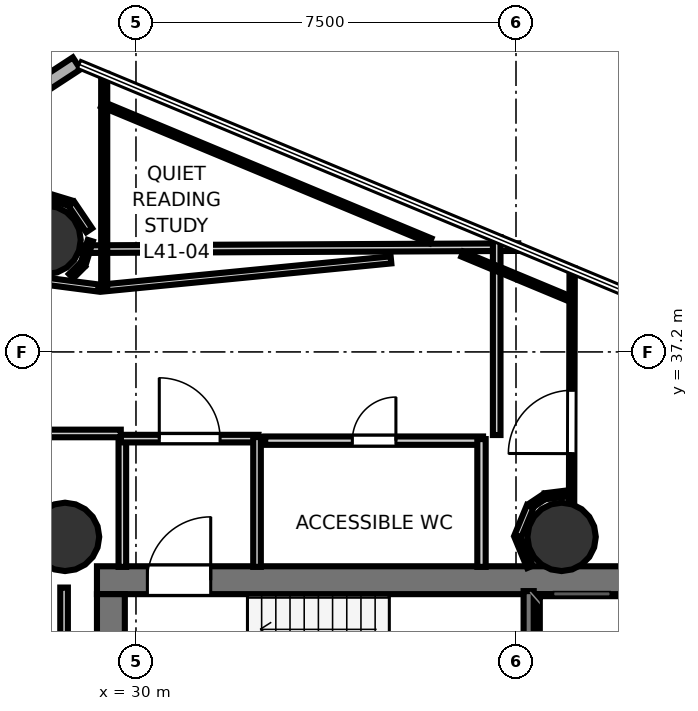
"""IFC4 building model, lengths in metres.
Left out: names, types, materials, properties, quantities, classifications, styles, units other than length and angle.
Written with IfcOpenShell. Run it as: python <this file> out.ifc"""

import sys

from ifc_helpers import new_model, si_unit, direction, frame, frame_2d, origin, origin_2d, place, context, subcontext, project, spatial, rectangle, hollow_circle, extrude, element, fill, save


model = new_model("IFC4")
c1 = context("Model", 3, precision=1e-05, world=origin(), true_north=direction((0.0, 1.0)))
c2 = subcontext(c1, "Body", "Model", "MODEL_VIEW")
j1 = project(units=[si_unit("LENGTHUNIT", "METRE"), si_unit("PLANEANGLEUNIT", "RADIAN")], contexts=[c1])
p1 = place(None, origin())
s1 = spatial("IfcSite", under=j1, at=p1, CompositionType="ELEMENT")
p2 = place(p1, origin())
s2 = spatial("IfcBuilding", under=s1, at=p2, CompositionType="ELEMENT")
p3 = place(p2, frame((0.0, 0.0, 162.4)))
s3 = spatial("IfcBuildingStorey", under=s2, at=p3, CompositionType="ELEMENT", Elevation=162.4)
p4 = place(p3, frame((29.23, 32.695, 0.0), z_axis=(0.0, 0.0, 1.0), x_axis=(1.0, 0.0, 0.0)))
e1 = element("IfcWall", 1, at=p4, inside=s3, PredefinedType="SHEAR", context=c2, shape_type="SweptSolid", body=[
    extrude(rectangle(XDim=10.62, YDim=0.55, at=frame_2d((5.31, 0.0))), origin(), (0.0, 0.0, 1.0), 3.52),
])
p5 = place(p4, frame((0.995, 0.0, 0.0)))
e2 = element("IfcOpeningElement", 2, at=p5, cuts=e1, PredefinedType="OPENING", context=c2, shape_type="SweptSolid", body=[
    extrude(rectangle(XDim=1.25, YDim=2.15, at=frame_2d((0.625, 1.075))), frame((0.0, 0.285, 0.0), z_axis=(0.0, -1.0, 0.0), x_axis=(1.0, 0.0, 0.0)), (0.0, 0.0, 1.0), 0.57),
])
p6 = place(p3, frame((29.505, 24.98, 0.0), z_axis=(0.0, 0.0, 1.0), x_axis=(0.0, 1.0, 0.0)))
e3 = element("IfcWall", 3, at=p6, inside=s3, PredefinedType="SHEAR", context=c2, shape_type="SweptSolid", body=[
    extrude(rectangle(XDim=7.44, YDim=0.55, at=frame_2d((3.72, 0.0))), origin(), (0.0, 0.0, 1.0), 3.52),
])
p7 = place(p3, frame((38.18, 24.98, 0.0), z_axis=(0.0, 0.0, 1.0), x_axis=(0.0, 1.0, 0.0)))
e4 = element("IfcWall", 4, at=p7, inside=s3, PredefinedType="SHEAR", context=c2, shape_type="SweptSolid", body=[
    extrude(rectangle(XDim=7.44, YDim=0.5, at=frame_2d((3.72, 0.0))), origin(), (0.0, 0.0, 1.0), 3.52),
])
for number, where, z_axis, x_axis in (
    (5, (28.6, 33.55, 0.0), (0.0, 0.0, 1.0), (1.0, 0.0, 0.0)),
    (6, (38.4, 33.55, 0.0), (0.0, 0.0, 1.0), (1.0, 0.0, 0.0)),
    (7, (28.235, 39.411, 0.0), (0.0, 0.0, 1.0), (1.0, 0.0, 0.0)),
):
    element("IfcColumn", number, at=place(p3, frame(where, z_axis=z_axis, x_axis=x_axis)), inside=s3, PredefinedType="COLUMN", context=c2, shape_type="SweptSolid", body=[
        extrude(hollow_circle(Radius=0.675, WallThickness=0.032, at=origin_2d()), origin(), (0.0, 0.0, 1.0), 3.7),
    ])
p8 = place(p3, frame((28.83, 42.894, 0.0), z_axis=(0.0, 0.0, 1.0), x_axis=(-0.837273291315, -0.5467846337, 0.0)))
e8 = element("IfcWall", 8, at=p8, inside=s3, PredefinedType="SOLIDWALL", context=c2, shape_type="SweptSolid", body=[
    extrude(rectangle(XDim=9.004, YDim=0.28, at=frame_2d((4.502, 0.0))), origin(), (0.0, 0.0, 1.0), 3.52),
])
p9 = place(p8, frame((1.951, 0.0, 0.85)))
e9 = element("IfcOpeningElement", 9, at=p9, cuts=e8, PredefinedType="OPENING", context=c2, shape_type="SweptSolid", body=[
    extrude(rectangle(XDim=1.5, YDim=2.1, at=frame_2d((0.75, 1.05))), frame((0.0, 0.15, 0.0), z_axis=(0.0, -1.0, 0.0), x_axis=(1.0, 0.0, 0.0)), (0.0, 0.0, 1.0), 0.3),
])
p10 = place(p3, frame((37.75, 30.12, 0.0), z_axis=(0.0, 0.0, 1.0), x_axis=(0.0, 1.0, 0.0)))
e10 = element("IfcWall", 10, at=p10, inside=s3, PredefinedType="SOLIDWALL", context=c2, shape_type="SweptSolid", body=[
    extrude(rectangle(XDim=2.36, YDim=0.2, at=frame_2d((1.18, 0.0))), origin(), (0.0, 0.0, 1.0), 3.52),
])
p11 = place(p3, frame((29.731, 32.958, 0.0), z_axis=(0.0, 0.0, 1.0), x_axis=(0.0, 1.0, 0.0)))
e11 = element("IfcWall", 11, at=p11, inside=s3, PredefinedType="PARTITIONING", context=c2, shape_type="SweptSolid", body=[
    extrude(rectangle(XDim=2.562, YDim=0.15, at=frame_2d((1.281, 0.0))), origin(), (0.0, 0.0, 1.0), 2.84),
])
p12 = place(p3, frame((29.7, 35.489, 0.0), z_axis=(0.0, 0.0, 1.0), x_axis=(1.0, 0.0, 0.0)))
e12 = element("IfcWall", 12, at=p12, inside=s3, PredefinedType="PARTITIONING", context=c2, shape_type="SweptSolid", body=[
    extrude(rectangle(XDim=2.72, YDim=0.15, at=frame_2d((1.36, 0.0))), origin(), (0.0, 0.0, 1.0), 2.84),
])
p13 = place(p12, frame((0.76, 0.0, 0.0)))
e13 = element("IfcOpeningElement", 13, at=p13, cuts=e12, PredefinedType="OPENING", context=c2, shape_type="SweptSolid", body=[
    extrude(rectangle(XDim=1.2, YDim=2.15, at=frame_2d((0.6, 1.075))), frame((0.0, 0.085, 0.0), z_axis=(0.0, -1.0, 0.0), x_axis=(1.0, 0.0, 0.0)), (0.0, 0.0, 1.0), 0.17),
])
p14 = place(p3, frame((32.389, 35.52, 0.0), z_axis=(0.0, 0.0, 1.0), x_axis=(0.0, -1.0, 0.0)))
e14 = element("IfcWall", 14, at=p14, inside=s3, PredefinedType="PARTITIONING", context=c2, shape_type="SweptSolid", body=[
    extrude(rectangle(XDim=2.562, YDim=0.15, at=frame_2d((1.281, 0.0))), origin(), (0.0, 0.0, 1.0), 2.84),
])
p15 = place(p3, frame((32.55, 35.449, 0.0), z_axis=(0.0, 0.0, 1.0), x_axis=(1.0, 0.0, 0.0)))
e15 = element("IfcWall", 15, at=p15, inside=s3, PredefinedType="PLUMBINGWALL", context=c2, shape_type="SweptSolid", body=[
    extrude(rectangle(XDim=4.3, YDim=0.165, at=frame_2d((2.15, 0.0))), origin(), (0.0, 0.0, 1.0), 2.84),
])
p16 = place(p15, frame((1.72, 0.0, 0.0)))
e16 = element("IfcOpeningElement", 16, at=p16, cuts=e15, PredefinedType="OPENING", context=c2, shape_type="SweptSolid", body=[
    extrude(rectangle(XDim=0.86, YDim=2.05, at=frame_2d((0.43, 1.025))), frame((0.0, 0.093, 0.0), z_axis=(0.0, -1.0, 0.0), x_axis=(1.0, 0.0, 0.0)), (0.0, 0.0, 1.0), 0.185),
])
p17 = place(p3, frame((36.819, 35.48, 0.0), z_axis=(0.0, 0.0, 1.0), x_axis=(0.0, -1.0, 0.0)))
e17 = element("IfcWall", 17, at=p17, inside=s3, PredefinedType="PLUMBINGWALL", context=c2, shape_type="SweptSolid", body=[
    extrude(rectangle(XDim=2.522, YDim=0.165, at=frame_2d((1.261, 0.0))), origin(), (0.0, 0.0, 1.0), 2.84),
])
p18 = place(p3, frame((28.581, 24.68, 0.0), z_axis=(0.0, 0.0, 1.0), x_axis=(0.0, 1.0, 0.0)))
e18 = element("IfcWall", 18, at=p18, inside=s3, PredefinedType="PARTITIONING", context=c2, shape_type="SweptSolid", body=[
    extrude(rectangle(XDim=7.87, YDim=0.15, at=frame_2d((3.935, 0.0))), origin(), (0.0, 0.0, 1.0), 2.84),
])
p19 = place(p3, frame((23.174, 39.201, 0.0), z_axis=(0.0, 0.0, 1.0), x_axis=(0.999989166238, 0.004654826148, 0.0)))
e19 = element("IfcWall", 19, at=p19, inside=s3, PredefinedType="PARTITIONING", context=c2, shape_type="SweptSolid", body=[
    extrude(rectangle(XDim=14.371, YDim=0.15, at=frame_2d((7.186, 0.0))), origin(), (0.0, 0.0, 1.0), 2.84),
])
p20 = place(p3, frame((37.119, 39.465, 0.0), z_axis=(0.0, 0.0, 1.0), x_axis=(0.0, -1.0, 0.0)))
e20 = element("IfcWall", 20, at=p20, inside=s3, PredefinedType="PARTITIONING", context=c2, shape_type="SweptSolid", body=[
    extrude(rectangle(XDim=3.905, YDim=0.15, at=frame_2d((1.953, 0.0))), origin(), (0.0, 0.0, 1.0), 2.84),
])
p21 = place(p3, frame((29.7, 35.591, 0.0), z_axis=(0.0, 0.0, 1.0), x_axis=(-1.0, 0.0, 0.0)))
e21 = element("IfcWall", 21, at=p21, inside=s3, PredefinedType="PARTITIONING", context=c2, shape_type="SweptSolid", body=[
    extrude(rectangle(XDim=3.12, YDim=0.15, at=frame_2d((1.56, 0.0))), origin(), (0.0, 0.0, 1.0), 2.84),
])
p22 = place(p3, frame((38.594, 32.958, 0.0), z_axis=(0.0, 0.0, 1.0), x_axis=(0.002446602671, 0.999997007063, 0.0)))
e22 = element("IfcWall", 22, at=p22, inside=s3, PredefinedType="PARTITIONING", context=c2, shape_type="SweptSolid", body=[
    extrude(rectangle(XDim=5.887, YDim=0.105, at=frame_2d((2.944, 0.0))), origin(), (0.0, 0.0, 1.0), 2.84),
])
p23 = place(p22, frame((2.235, 0.0, 0.0)))
e23 = element("IfcOpeningElement", 23, at=p23, cuts=e22, PredefinedType="OPENING", context=c2, shape_type="SweptSolid", body=[
    extrude(rectangle(XDim=1.25, YDim=2.2, at=frame_2d((0.625, 1.1))), frame((0.0, 0.062, 0.0), z_axis=(0.0, -1.0, 0.0), x_axis=(1.0, 0.0, 0.0)), (0.0, 0.0, 1.0), 0.125),
])
p24 = place(p3, frame((35.033, 39.016, 0.0), z_axis=(0.0, 0.0, 1.0), x_axis=(-0.995275640249, -0.097089648918, 0.0)))
e24 = element("IfcWall", 24, at=p24, inside=s3, PredefinedType="PARTITIONING", context=c2, shape_type="SweptSolid", body=[
    extrude(rectangle(XDim=5.718, YDim=0.14, at=frame_2d((2.859, 0.0))), origin(), (0.0, 0.0, 1.0), 2.84),
])
p25 = place(p3, frame((29.373, 38.43, 0.0), z_axis=(0.0, 0.0, 1.0), x_axis=(0.0, 1.0, 0.0)))
e25 = element("IfcWall", 25, at=p25, inside=s3, PredefinedType="PARTITIONING", context=c2, shape_type="SweptSolid", body=[
    extrude(rectangle(XDim=4.258, YDim=0.12, at=frame_2d((2.129, 0.0))), origin(), (0.0, 0.0, 1.0), 2.84),
])
p26 = place(p3, frame((29.33, 42.089, 0.0), z_axis=(0.0, 0.0, 1.0), x_axis=(0.923257907731, -0.384180733265, 0.0)))
e26 = element("IfcWall", 26, at=p26, inside=s3, PredefinedType="PARTITIONING", context=c2, shape_type="SweptSolid", body=[
    extrude(rectangle(XDim=7.02, YDim=0.105, at=frame_2d((3.51, 0.0))), origin(), (0.0, 0.0, 1.0), 2.84),
])
p27 = place(p3, frame((38.502, 34.406, 0.0), z_axis=(0.0, 0.0, 1.0), x_axis=(-0.992260340351, -0.124174945004, 0.0)))
e27 = element("IfcWall", 27, at=p27, inside=s3, PredefinedType="PARTITIONING", context=c2, shape_type="SweptSolid", body=[
    extrude(rectangle(XDim=0.429, YDim=0.12, at=frame_2d((0.214, 0.0))), origin(), (0.0, 0.0, 1.0), 2.84),
])
p28 = place(p3, frame((38.063, 34.347, 0.0), z_axis=(0.0, 0.0, 1.0), x_axis=(-0.83170430964, -0.555218822922, 0.0)))
e28 = element("IfcWall", 28, at=p28, inside=s3, PredefinedType="PARTITIONING", context=c2, shape_type="SweptSolid", body=[
    extrude(rectangle(XDim=0.326, YDim=0.105, at=frame_2d((0.163, 0.0))), origin(), (0.0, 0.0, 1.0), 2.84),
])
p29 = place(p3, frame((37.781, 34.152, 0.0), z_axis=(0.0, 0.0, 1.0), x_axis=(-0.382824178437, -0.923821221018, 0.0)))
e29 = element("IfcWall", 29, at=p29, inside=s3, PredefinedType="PARTITIONING", context=c2, shape_type="SweptSolid", body=[
    extrude(rectangle(XDim=0.639, YDim=0.14, at=frame_2d((0.319, 0.0))), origin(), (0.0, 0.0, 1.0), 2.84),
])
p30 = place(p3, frame((37.536, 33.538, 0.0), z_axis=(0.0, 0.0, 1.0), x_axis=(0.382626535499, -0.923903097912, 0.0)))
e30 = element("IfcWall", 30, at=p30, inside=s3, PredefinedType="PARTITIONING", context=c2, shape_type="SweptSolid", body=[
    extrude(rectangle(XDim=0.628, YDim=0.12, at=frame_2d((0.314, 0.0))), origin(), (0.0, 0.0, 1.0), 2.84),
])
p31 = place(p3, frame((29.076, 39.602, 0.0), z_axis=(0.0, 0.0, 1.0), x_axis=(-0.559799741872, 0.828627931584, 0.0)))
e31 = element("IfcWall", 31, at=p31, inside=s3, PredefinedType="PARTITIONING", context=c2, shape_type="SweptSolid", body=[
    extrude(rectangle(XDim=0.628, YDim=0.14, at=frame_2d((0.314, 0.0))), origin(), (0.0, 0.0, 1.0), 2.84),
])
p32 = place(p3, frame((28.708, 40.135, 0.0), z_axis=(0.0, 0.0, 1.0), x_axis=(-0.95703287226, 0.289979449985, 0.0)))
e32 = element("IfcWall", 32, at=p32, inside=s3, PredefinedType="PARTITIONING", context=c2, shape_type="SweptSolid", body=[
    extrude(rectangle(XDim=0.485, YDim=0.12, at=frame_2d((0.242, 0.0))), origin(), (0.0, 0.0, 1.0), 2.84),
])
p33 = place(p3, frame((28.721, 38.695, 0.0), z_axis=(0.0, 0.0, 1.0), x_axis=(0.707106781187, 0.707106781187, 0.0)))
e33 = element("IfcWall", 33, at=p33, inside=s3, PredefinedType="PARTITIONING", context=c2, shape_type="SweptSolid", body=[
    extrude(rectangle(XDim=0.326, YDim=0.12, at=frame_2d((0.163, 0.0))), origin(), (0.0, 0.0, 1.0), 2.84),
])
p34 = place(p3, frame((28.959, 38.938, 0.0), z_axis=(0.0, 0.0, 1.0), x_axis=(0.292866596221, 0.956153312402, 0.0)))
e34 = element("IfcWall", 34, at=p34, inside=s3, PredefinedType="PARTITIONING", context=c2, shape_type="SweptSolid", body=[
    extrude(rectangle(XDim=0.479, YDim=0.105, at=frame_2d((0.239, 0.0))), origin(), (0.0, 0.0, 1.0), 2.84),
])
p35 = place(p3, frame((29.258, 38.461, 0.0), z_axis=(0.0, 0.0, 1.0), x_axis=(-0.991648515984, 0.128969844331, 0.0)))
e35 = element("IfcWall", 35, at=p35, inside=s3, PredefinedType="PARTITIONING", context=c2, shape_type="SweptSolid", body=[
    extrude(rectangle(XDim=3.956, YDim=0.14, at=frame_2d((1.978, 0.0))), origin(), (0.0, 0.0, 1.0), 2.84),
])
p36 = place(p3, frame((36.441, 39.13, 0.0), z_axis=(0.0, 0.0, 1.0), x_axis=(0.923215709741, -0.384282127202, 0.0)))
e36 = element("IfcWall", 36, at=p36, inside=s3, PredefinedType="PARTITIONING", context=c2, shape_type="SweptSolid", body=[
    extrude(rectangle(XDim=2.237, YDim=0.105, at=frame_2d((1.119, 0.0))), origin(), (0.0, 0.0, 1.0), 2.84),
])
p37 = place(p5, origin())
e37 = element("IfcDoor", 37, at=p37, inside=s3, OperationType="SINGLE_SWING_RIGHT", PredefinedType="DOOR", context=c2, shape_type="SweptSolid", body=[
    extrude(rectangle(XDim=1.25, YDim=2.15, at=frame_2d((0.625, 1.075))), frame((0.0, 0.025, 0.0), z_axis=(0.0, -1.0, 0.0), x_axis=(1.0, 0.0, 0.0)), (0.0, 0.0, 1.0), 0.05),
])
fill(e2, e37)
p38 = place(p13, origin())
e38 = element("IfcDoor", 38, at=p38, inside=s3, OperationType="SINGLE_SWING_LEFT", PredefinedType="DOOR", context=c2, shape_type="SweptSolid", body=[
    extrude(rectangle(XDim=1.2, YDim=2.15, at=frame_2d((0.6, 1.075))), frame((0.0, 0.025, 0.0), z_axis=(0.0, -1.0, 0.0), x_axis=(1.0, 0.0, 0.0)), (0.0, 0.0, 1.0), 0.05),
])
fill(e13, e38)
p39 = place(p16, origin())
e39 = element("IfcDoor", 39, at=p39, inside=s3, OperationType="SINGLE_SWING_RIGHT", PredefinedType="DOOR", context=c2, shape_type="SweptSolid", body=[
    extrude(rectangle(XDim=0.86, YDim=2.05, at=frame_2d((0.43, 1.025))), frame((0.0, 0.025, 0.0), z_axis=(0.0, -1.0, 0.0), x_axis=(1.0, 0.0, 0.0)), (0.0, 0.0, 1.0), 0.05),
])
fill(e16, e39)
p40 = place(p23, origin())
e40 = element("IfcDoor", 40, at=p40, inside=s3, OperationType="SINGLE_SWING_LEFT", PredefinedType="DOOR", context=c2, shape_type="SweptSolid", body=[
    extrude(rectangle(XDim=1.25, YDim=2.2, at=frame_2d((0.625, 1.1))), frame((0.0, 0.025, 0.0), z_axis=(0.0, -1.0, 0.0), x_axis=(1.0, 0.0, 0.0)), (0.0, 0.0, 1.0), 0.05),
])
fill(e23, e40)
save(model, sys.argv[1])
